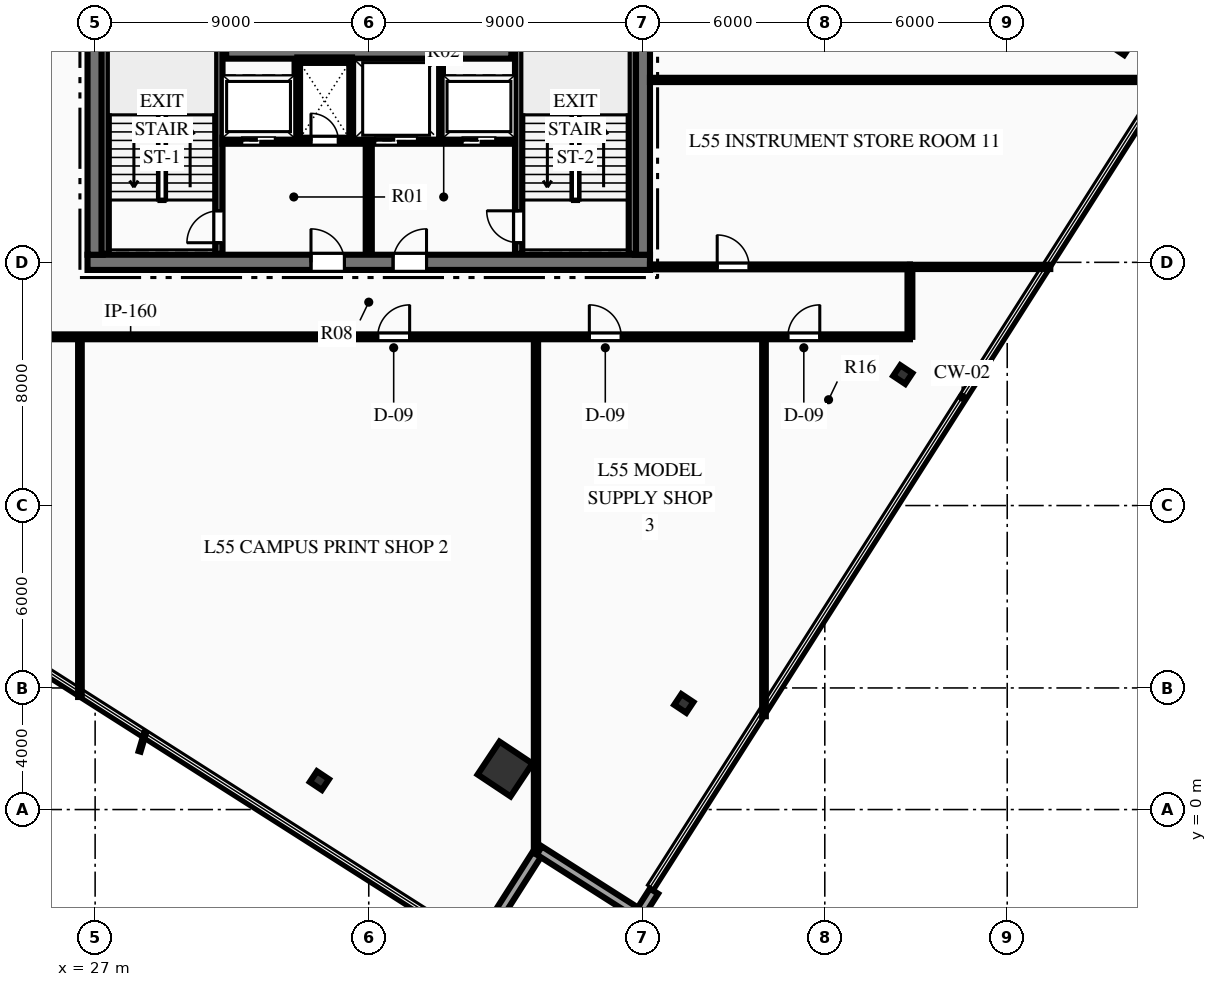
"""IFC4 building model, lengths in metres.
Left out: names, types, materials, properties, quantities, classifications, styles, units other than length and angle.
Written with IfcOpenShell. Run it as: python <this file> out.ifc"""

import sys

from ifc_helpers import new_model, si_unit, direction, frame, frame_2d, origin, origin_2d, place, context, subcontext, project, spatial, rectangle, hollow_rectangle, i_section, extrude, element, fill, save


model = new_model("IFC4")
c1 = context("Model", 3, precision=1e-05, world=origin(), true_north=direction((0.0, 1.0)))
c2 = subcontext(c1, "Body", "Model", "MODEL_VIEW")
j1 = project(units=[si_unit("LENGTHUNIT", "METRE"), si_unit("PLANEANGLEUNIT", "RADIAN")], contexts=[c1])
p1 = place(None, origin())
s1 = spatial("IfcSite", under=j1, at=p1, CompositionType="ELEMENT")
p2 = place(p1, origin())
s2 = spatial("IfcBuilding", under=s1, at=p2, CompositionType="ELEMENT")
p3 = place(p2, frame((0.0, 0.0, 220.95)))
s3 = spatial("IfcBuildingStorey", under=s2, at=p3, CompositionType="ELEMENT", Elevation=220.95)
p4 = place(p3, frame((26.75, 18.0, 0.0), z_axis=(0.0, 0.0, 1.0), x_axis=(1.0, 0.0, 0.0)))
e1 = element("IfcWall", 1, at=p4, inside=s3, PredefinedType="SHEAR", context=c2, shape_type="SweptSolid", body=[
    extrude(rectangle(XDim=18.5, YDim=0.5, at=frame_2d((9.25, 0.0))), origin(), (0.0, 0.0, 1.0), 3.75),
])
p5 = place(p4, frame((7.35, 0.0, 0.0)))
e2 = element("IfcOpeningElement", 2, at=p5, cuts=e1, PredefinedType="OPENING", context=c2, shape_type="SweptSolid", body=[
    extrude(rectangle(XDim=1.1, YDim=2.15, at=frame_2d((0.55, 1.075))), frame((0.0, 0.26, 0.0), z_axis=(0.0, -1.0, 0.0), x_axis=(1.0, 0.0, 0.0)), (0.0, 0.0, 1.0), 0.52),
])
p6 = place(p4, frame((10.05, 0.0, 0.0)))
e3 = element("IfcOpeningElement", 3, at=p6, cuts=e1, PredefinedType="OPENING", context=c2, shape_type="SweptSolid", body=[
    extrude(rectangle(XDim=1.1, YDim=2.15, at=frame_2d((0.55, 1.075))), frame((0.0, 0.26, 0.0), z_axis=(0.0, -1.0, 0.0), x_axis=(1.0, 0.0, 0.0)), (0.0, 0.0, 1.0), 0.52),
])
p7 = place(p3, frame((27.0, 18.25, 0.0), z_axis=(0.0, 0.0, 1.0), x_axis=(0.0, 1.0, 0.0)))
e4 = element("IfcWall", 4, at=p7, inside=s3, PredefinedType="SHEAR", context=c2, shape_type="SweptSolid", body=[
    extrude(rectangle(XDim=15.5, YDim=0.5, at=frame_2d((7.75, 0.0))), origin(), (0.0, 0.0, 1.0), 3.75),
])
p8 = place(p7, frame((9.99, 0.0, 0.0)))
e5 = element("IfcOpeningElement", 5, at=p8, cuts=e4, PredefinedType="OPENING", context=c2, shape_type="SweptSolid", body=[
    extrude(rectangle(XDim=1.4, YDim=2.2, at=frame_2d((0.7, 1.1))), frame((0.0, 0.26, 0.0), z_axis=(0.0, -1.0, 0.0), x_axis=(1.0, 0.0, 0.0)), (0.0, 0.0, 1.0), 0.52),
])
p9 = place(p3, frame((45.0, 18.25, 0.0), z_axis=(0.0, 0.0, 1.0), x_axis=(0.0, 1.0, 0.0)))
e6 = element("IfcWall", 6, at=p9, inside=s3, PredefinedType="SHEAR", context=c2, shape_type="SweptSolid", body=[
    extrude(rectangle(XDim=15.5, YDim=0.5, at=frame_2d((7.75, 0.0))), origin(), (0.0, 0.0, 1.0), 3.75),
])
p10 = place(p9, frame((9.99, 0.0, 0.0)))
e7 = element("IfcOpeningElement", 7, at=p10, cuts=e6, PredefinedType="OPENING", context=c2, shape_type="SweptSolid", body=[
    extrude(rectangle(XDim=1.4, YDim=2.2, at=frame_2d((0.7, 1.1))), frame((0.0, 0.26, 0.0), z_axis=(0.0, -1.0, 0.0), x_axis=(1.0, 0.0, 0.0)), (0.0, 0.0, 1.0), 0.52),
])
p11 = place(p3, frame((31.31, 24.95, 0.0), z_axis=(0.0, 0.0, 1.0), x_axis=(1.0, 0.0, 0.0)))
e8 = element("IfcWall", 8, at=p11, inside=s3, PredefinedType="SHEAR", context=c2, shape_type="SweptSolid", body=[
    extrude(rectangle(XDim=9.38, YDim=0.5, at=frame_2d((4.69, 0.0))), origin(), (0.0, 0.0, 1.0), 3.75),
])
p12 = place(p3, frame((31.07, 18.28, 0.0), z_axis=(0.0, 0.0, 1.0), x_axis=(0.0, 1.0, 0.0)))
e9 = element("IfcWall", 9, at=p12, inside=s3, PredefinedType="SHEAR", context=c2, shape_type="SweptSolid", body=[
    extrude(rectangle(XDim=8.26, YDim=0.24, at=frame_2d((4.13, 0.0))), origin(), (0.0, 0.0, 1.0), 3.75),
])
p13 = place(p12, frame((0.365, 0.0, 0.0)))
e10 = element("IfcOpeningElement", 10, at=p13, cuts=e9, PredefinedType="OPENING", context=c2, shape_type="SweptSolid", body=[
    extrude(rectangle(XDim=1.05, YDim=2.15, at=frame_2d((0.525, 1.075))), frame((0.0, 0.13, 0.0), z_axis=(0.0, -1.0, 0.0), x_axis=(1.0, 0.0, 0.0)), (0.0, 0.0, 1.0), 0.26),
])
p14 = place(p3, frame((27.33, 18.28, 0.0), z_axis=(0.0, 0.0, 1.0), x_axis=(0.0, 1.0, 0.0)))
e11 = element("IfcWall", 11, at=p14, inside=s3, PredefinedType="SHEAR", context=c2, shape_type="SweptSolid", body=[
    extrude(rectangle(XDim=8.26, YDim=0.24, at=frame_2d((4.13, 0.0))), origin(), (0.0, 0.0, 1.0), 3.75),
])
p15 = place(p3, frame((40.93, 18.28, 0.0), z_axis=(0.0, 0.0, 1.0), x_axis=(0.0, 1.0, 0.0)))
e12 = element("IfcWall", 12, at=p15, inside=s3, PredefinedType="SHEAR", context=c2, shape_type="SweptSolid", body=[
    extrude(rectangle(XDim=8.26, YDim=0.24, at=frame_2d((4.13, 0.0))), origin(), (0.0, 0.0, 1.0), 3.75),
])
p16 = place(p15, frame((0.365, 0.0, 0.0)))
e13 = element("IfcOpeningElement", 13, at=p16, cuts=e12, PredefinedType="OPENING", context=c2, shape_type="SweptSolid", body=[
    extrude(rectangle(XDim=1.05, YDim=2.15, at=frame_2d((0.525, 1.075))), frame((0.0, 0.13, 0.0), z_axis=(0.0, -1.0, 0.0), x_axis=(1.0, 0.0, 0.0)), (0.0, 0.0, 1.0), 0.26),
])
p17 = place(p3, frame((44.67, 18.28, 0.0), z_axis=(0.0, 0.0, 1.0), x_axis=(0.0, 1.0, 0.0)))
e14 = element("IfcWall", 14, at=p17, inside=s3, PredefinedType="SHEAR", context=c2, shape_type="SweptSolid", body=[
    extrude(rectangle(XDim=8.26, YDim=0.24, at=frame_2d((4.13, 0.0))), origin(), (0.0, 0.0, 1.0), 3.75),
])
p18 = place(p3, frame((40.483, 1.333, 0.0), z_axis=(0.0, 0.0, 1.0), x_axis=(0.554118199338, 0.832437998389, 0.0)))
e15 = element("IfcColumn", 15, at=p18, inside=s3, PredefinedType="COLUMN", context=c2, shape_type="SweptSolid", body=[
    extrude(hollow_rectangle(XDim=1.3, YDim=1.3, WallThickness=0.06, at=origin_2d()), origin(), (0.0, 0.0, 1.0), 3.75),
])
for number, where, z_axis, x_axis in (
    (16, (46.363, 3.49, 0.0), (0.0, 0.0, 1.0), (0.554, 0.832, 0.0)),
    (17, (53.564, 14.308, 0.0), (0.0, 0.0, 1.0), (0.554, 0.832, 0.0)),
    (18, (60.766, 25.126, 0.0), (0.0, 0.0, 1.0), (0.554, 0.832, 0.0)),
    (19, (34.377, 0.952, 0.0), (0.0, 0.0, 1.0), (0.554, 0.832, 0.0)),
):
    element("IfcColumn", number, at=place(p3, frame(where, z_axis=z_axis, x_axis=x_axis)), inside=s3, PredefinedType="COLUMN", context=c2, shape_type="SweptSolid", body=[
        extrude(i_section(OverallWidth=0.424, OverallDepth=0.474, WebThickness=0.048, FlangeThickness=0.077, at=origin_2d()), origin(), (0.0, 0.0, 1.0), 3.75),
    ])
p19 = place(p3, frame((45.383, -2.683, 0.0), z_axis=(0.0, 0.0, 1.0), x_axis=(-0.537366861127, -0.843348597297, 0.0)))
e20 = element("IfcWall", 20, at=p19, inside=s3, PredefinedType="STANDARD", context=c2, shape_type="SweptSolid", body=[
    extrude(rectangle(XDim=0.9, YDim=0.32, at=frame_2d((0.45, 0.0))), origin(), (0.0, 0.0, 1.0), 3.47),
])
p20 = place(p3, frame((41.61, -1.347, 0.0), z_axis=(0.0, 0.0, 1.0), x_axis=(-0.537288582266, -0.8433984701, 0.0)))
e21 = element("IfcWall", 21, at=p20, inside=s3, PredefinedType="STANDARD", context=c2, shape_type="SweptSolid", body=[
    extrude(rectangle(XDim=3.9, YDim=0.32, at=frame_2d((1.95, 0.0))), origin(), (0.0, 0.0, 1.0), 3.47),
])
p21 = place(p3, frame((44.899, -3.442, 0.0), z_axis=(0.0, 0.0, 1.0), x_axis=(-0.843380397605, 0.537316950166, 0.0)))
e22 = element("IfcWall", 22, at=p21, inside=s3, PredefinedType="STANDARD", context=c2, shape_type="SweptSolid", body=[
    extrude(rectangle(XDim=3.9, YDim=0.32, at=frame_2d((1.95, 0.0))), origin(), (0.0, 0.0, 1.0), 3.47),
])
p22 = place(p3, frame((36.0, 18.28, 0.0), z_axis=(0.0, 0.0, 1.0), x_axis=(0.0, 1.0, 0.0)))
e23 = element("IfcWall", 23, at=p22, inside=s3, PredefinedType="PARTITIONING", context=c2, shape_type="SweptSolid", body=[
    extrude(rectangle(XDim=3.77, YDim=0.2, at=frame_2d((1.885, 0.0))), origin(), (0.0, 0.0, 1.0), 3.47),
])
p23 = place(p3, frame((31.19, 22.0, 0.0), z_axis=(0.0, 0.0, 1.0), x_axis=(1.0, 0.0, 0.0)))
e24 = element("IfcWall", 24, at=p23, inside=s3, PredefinedType="PARTITIONING", context=c2, shape_type="SweptSolid", body=[
    extrude(rectangle(XDim=4.69, YDim=0.2, at=frame_2d((2.345, 0.0))), origin(), (0.0, 0.0, 1.0), 3.47),
])
p24 = place(p23, frame((2.91, 0.0, 0.0)))
e25 = element("IfcOpeningElement", 25, at=p24, cuts=e24, PredefinedType="OPENING", context=c2, shape_type="SweptSolid", body=[
    extrude(rectangle(XDim=0.9, YDim=2.15, at=frame_2d((0.45, 1.075))), frame((0.0, 0.11, 0.0), z_axis=(0.0, -1.0, 0.0), x_axis=(1.0, 0.0, 0.0)), (0.0, 0.0, 1.0), 0.22),
])
p25 = place(p23, frame((0.635, 0.0, 0.0)))
e26 = element("IfcOpeningElement", 26, at=p25, cuts=e24, PredefinedType="OPENING", context=c2, shape_type="SweptSolid", body=[
    extrude(rectangle(XDim=1.1, YDim=2.15, at=frame_2d((0.55, 1.075))), frame((0.0, 0.11, 0.0), z_axis=(0.0, -1.0, 0.0), x_axis=(1.0, 0.0, 0.0)), (0.0, 0.0, 1.0), 0.22),
])
p26 = place(p3, frame((36.12, 22.0, 0.0), z_axis=(0.0, 0.0, 1.0), x_axis=(1.0, 0.0, 0.0)))
e27 = element("IfcWall", 27, at=p26, inside=s3, PredefinedType="PARTITIONING", context=c2, shape_type="SweptSolid", body=[
    extrude(rectangle(XDim=4.69, YDim=0.2, at=frame_2d((2.345, 0.0))), origin(), (0.0, 0.0, 1.0), 3.47),
])
p27 = place(p26, frame((2.955, 0.0, 0.0)))
e28 = element("IfcOpeningElement", 28, at=p27, cuts=e27, PredefinedType="OPENING", context=c2, shape_type="SweptSolid", body=[
    extrude(rectangle(XDim=1.1, YDim=2.15, at=frame_2d((0.55, 1.075))), frame((0.0, 0.11, 0.0), z_axis=(0.0, -1.0, 0.0), x_axis=(1.0, 0.0, 0.0)), (0.0, 0.0, 1.0), 0.22),
])
p28 = place(p26, frame((0.08, 0.0, 0.0)))
e29 = element("IfcOpeningElement", 29, at=p28, cuts=e27, PredefinedType="OPENING", context=c2, shape_type="SweptSolid", body=[
    extrude(rectangle(XDim=1.4, YDim=2.2, at=frame_2d((0.7, 1.1))), frame((0.0, 0.11, 0.0), z_axis=(0.0, -1.0, 0.0), x_axis=(1.0, 0.0, 0.0)), (0.0, 0.0, 1.0), 0.22),
])
for number, where, z_axis, x_axis in (
    (30, (33.65, 22.05, 0.0), (0.0, 0.0, 1.0), (0.0, 1.0, 0.0)),
    (31, (35.45, 22.05, 0.0), (0.0, 0.0, 1.0), (0.0, 1.0, 0.0)),
):
    element("IfcWall", number, at=place(p3, frame(where, z_axis=z_axis, x_axis=x_axis)), inside=s3, PredefinedType="PARTITIONING", context=c2, shape_type="SweptSolid", body=[
        extrude(rectangle(XDim=2.6, YDim=0.18, at=frame_2d((1.3, 0.0))), origin(), (0.0, 0.0, 1.0), 3.47),
    ])
p29 = place(p3, frame((33.65, 24.65, 0.0), z_axis=(0.0, 0.0, 1.0), x_axis=(1.0, 0.0, 0.0)))
e32 = element("IfcWall", 32, at=p29, inside=s3, PredefinedType="PARTITIONING", context=c2, shape_type="SweptSolid", body=[
    extrude(rectangle(XDim=1.8, YDim=0.18, at=frame_2d((0.9, 0.0))), origin(), (0.0, 0.0, 1.0), 3.47),
])
p30 = place(p3, frame((38.35, 22.05, 0.0), z_axis=(0.0, 0.0, 1.0), x_axis=(0.0, 1.0, 0.0)))
e33 = element("IfcWall", 33, at=p30, inside=s3, PredefinedType="PARTITIONING", context=c2, shape_type="SweptSolid", body=[
    extrude(rectangle(XDim=2.6, YDim=0.18, at=frame_2d((1.3, 0.0))), origin(), (0.0, 0.0, 1.0), 3.47),
])
p31 = place(p3, frame((18.2, 15.55, 0.0), z_axis=(0.0, 0.0, 1.0), x_axis=(1.0, 0.0, 0.0)))
e34 = element("IfcWall", 34, at=p31, inside=s3, PredefinedType="PARTITIONING", context=c2, shape_type="SweptSolid", body=[
    extrude(rectangle(XDim=35.6, YDim=0.16, at=frame_2d((17.8, 0.0))), origin(), (0.0, 0.0, 1.0), 2.849),
])
p32 = place(p31, frame((3.791, 0.0, 0.0)))
e35 = element("IfcOpeningElement", 35, at=p32, cuts=e34, PredefinedType="OPENING", context=c2, shape_type="SweptSolid", body=[
    extrude(rectangle(XDim=1.05, YDim=2.15, at=frame_2d((0.525, 1.075))), frame((0.0, 0.09, 0.0), z_axis=(0.0, -1.0, 0.0), x_axis=(1.0, 0.0, 0.0)), (0.0, 0.0, 1.0), 0.18),
])
p33 = place(p31, frame((18.095, 0.0, 0.0)))
e36 = element("IfcOpeningElement", 36, at=p33, cuts=e34, PredefinedType="OPENING", context=c2, shape_type="SweptSolid", body=[
    extrude(rectangle(XDim=1.05, YDim=2.15, at=frame_2d((0.525, 1.075))), frame((0.0, 0.09, 0.0), z_axis=(0.0, -1.0, 0.0), x_axis=(1.0, 0.0, 0.0)), (0.0, 0.0, 1.0), 0.18),
])
p34 = place(p31, frame((25.055, 0.0, 0.0)))
e37 = element("IfcOpeningElement", 37, at=p34, cuts=e34, PredefinedType="OPENING", context=c2, shape_type="SweptSolid", body=[
    extrude(rectangle(XDim=1.05, YDim=2.15, at=frame_2d((0.525, 1.075))), frame((0.0, 0.09, 0.0), z_axis=(0.0, -1.0, 0.0), x_axis=(1.0, 0.0, 0.0)), (0.0, 0.0, 1.0), 0.18),
])
p35 = place(p31, frame((31.585, 0.0, 0.0)))
e38 = element("IfcOpeningElement", 38, at=p35, cuts=e34, PredefinedType="OPENING", context=c2, shape_type="SweptSolid", body=[
    extrude(rectangle(XDim=1.05, YDim=2.15, at=frame_2d((0.525, 1.075))), frame((0.0, 0.09, 0.0), z_axis=(0.0, -1.0, 0.0), x_axis=(1.0, 0.0, 0.0)), (0.0, 0.0, 1.0), 0.18),
])
p36 = place(p3, frame((45.25, 17.85, 0.0), z_axis=(0.0, 0.0, 1.0), x_axis=(1.0, 0.0, 0.0)))
e39 = element("IfcWall", 39, at=p36, inside=s3, PredefinedType="PARTITIONING", context=c2, shape_type="SweptSolid", body=[
    extrude(rectangle(XDim=8.55, YDim=0.16, at=frame_2d((4.275, 0.0))), origin(), (0.0, 0.0, 1.0), 3.47),
])
p37 = place(p36, frame((2.211, 0.0, 0.0)))
e40 = element("IfcOpeningElement", 40, at=p37, cuts=e39, PredefinedType="OPENING", context=c2, shape_type="SweptSolid", body=[
    extrude(rectangle(XDim=1.05, YDim=2.15, at=frame_2d((0.525, 1.075))), frame((0.0, 0.09, 0.0), z_axis=(0.0, -1.0, 0.0), x_axis=(1.0, 0.0, 0.0)), (0.0, 0.0, 1.0), 0.18),
])
p38 = place(p3, frame((53.8, 15.55, 0.0), z_axis=(0.0, 0.0, 1.0), x_axis=(0.0, 1.0, 0.0)))
e41 = element("IfcWall", 41, at=p38, inside=s3, PredefinedType="PARTITIONING", context=c2, shape_type="SweptSolid", body=[
    extrude(rectangle(XDim=2.3, YDim=0.16, at=frame_2d((1.15, 0.0))), origin(), (0.0, 0.0, 1.0), 3.47),
])
p39 = place(p3, frame((53.8, 17.85, 0.0), z_axis=(0.0, 0.0, 1.0), x_axis=(1.0, 0.0, 0.0)))
e42 = element("IfcWall", 42, at=p39, inside=s3, PredefinedType="PARTITIONING", context=c2, shape_type="SweptSolid", body=[
    extrude(rectangle(XDim=4.616, YDim=0.14, at=frame_2d((2.308, 0.0))), origin(), (0.0, 0.0, 1.0), 3.47),
])
p40 = place(p3, frame((26.5, 3.702, 0.0), z_axis=(0.0, 0.0, 1.0), x_axis=(0.0, 1.0, 0.0)))
e43 = element("IfcWall", 43, at=p40, inside=s3, PredefinedType="PARTITIONING", context=c2, shape_type="SweptSolid", body=[
    extrude(rectangle(XDim=11.848, YDim=0.12, at=frame_2d((5.924, 0.0))), origin(), (0.0, 0.0, 1.0), 2.849),
])
p41 = place(p3, frame((41.5, -1.445, 0.0), z_axis=(0.0, 0.0, 1.0), x_axis=(0.0, 1.0, 0.0)))
e44 = element("IfcWall", 44, at=p41, inside=s3, PredefinedType="PARTITIONING", context=c2, shape_type="SweptSolid", body=[
    extrude(rectangle(XDim=16.995, YDim=0.14, at=frame_2d((8.498, 0.0))), origin(), (0.0, 0.0, 1.0), 3.47),
])
p42 = place(p3, frame((49.0, 3.069, 0.0), z_axis=(0.0, 0.0, 1.0), x_axis=(0.0, 1.0, 0.0)))
e45 = element("IfcWall", 45, at=p42, inside=s3, PredefinedType="PARTITIONING", context=c2, shape_type="SweptSolid", body=[
    extrude(rectangle(XDim=12.481, YDim=0.12, at=frame_2d((6.241, 0.0))), origin(), (0.0, 0.0, 1.0), 3.47),
])
p43 = place(p3, frame((45.25, 24.0, 0.0), z_axis=(0.0, 0.0, 1.0), x_axis=(1.0, 0.0, 0.0)))
e46 = element("IfcWall", 46, at=p43, inside=s3, PredefinedType="PARTITIONING", context=c2, shape_type="SweptSolid", body=[
    extrude(rectangle(XDim=17.085, YDim=0.14, at=frame_2d((8.542, 0.0))), origin(), (0.0, 0.0, 1.0), 3.47),
])
p44 = place(p13, origin())
e47 = element("IfcDoor", 47, at=p44, inside=s3, OperationType="SINGLE_SWING_LEFT", PredefinedType="DOOR", context=c2, shape_type="SweptSolid", body=[
    extrude(rectangle(XDim=1.05, YDim=2.15, at=frame_2d((0.525, 1.075))), frame((0.0, 0.025, 0.0), z_axis=(0.0, -1.0, 0.0), x_axis=(1.0, 0.0, 0.0)), (0.0, 0.0, 1.0), 0.05),
])
fill(e10, e47)
p45 = place(p16, origin())
e48 = element("IfcDoor", 48, at=p45, inside=s3, OperationType="SINGLE_SWING_RIGHT", PredefinedType="DOOR", context=c2, shape_type="SweptSolid", body=[
    extrude(rectangle(XDim=1.05, YDim=2.15, at=frame_2d((0.525, 1.075))), frame((0.0, 0.025, 0.0), z_axis=(0.0, -1.0, 0.0), x_axis=(1.0, 0.0, 0.0)), (0.0, 0.0, 1.0), 0.05),
])
fill(e13, e48)
p46 = place(p5, origin())
e49 = element("IfcDoor", 49, at=p46, inside=s3, OperationType="SINGLE_SWING_LEFT", PredefinedType="DOOR", context=c2, shape_type="SweptSolid", body=[
    extrude(rectangle(XDim=1.1, YDim=2.15, at=frame_2d((0.55, 1.075))), frame((0.0, 0.025, 0.0), z_axis=(0.0, -1.0, 0.0), x_axis=(1.0, 0.0, 0.0)), (0.0, 0.0, 1.0), 0.05),
])
fill(e2, e49)
p47 = place(p6, origin())
e50 = element("IfcDoor", 50, at=p47, inside=s3, OperationType="SINGLE_SWING_RIGHT", PredefinedType="DOOR", context=c2, shape_type="SweptSolid", body=[
    extrude(rectangle(XDim=1.1, YDim=2.15, at=frame_2d((0.55, 1.075))), frame((0.0, 0.025, 0.0), z_axis=(0.0, -1.0, 0.0), x_axis=(1.0, 0.0, 0.0)), (0.0, 0.0, 1.0), 0.05),
])
fill(e3, e50)
p48 = place(p24, origin())
e51 = element("IfcDoor", 51, at=p48, inside=s3, OperationType="SINGLE_SWING_LEFT", PredefinedType="DOOR", context=c2, shape_type="SweptSolid", body=[
    extrude(rectangle(XDim=0.9, YDim=2.15, at=frame_2d((0.45, 1.075))), frame((0.0, 0.025, 0.0), z_axis=(0.0, -1.0, 0.0), x_axis=(1.0, 0.0, 0.0)), (0.0, 0.0, 1.0), 0.05),
])
fill(e25, e51)
p49 = place(p33, origin())
e52 = element("IfcDoor", 52, at=p49, inside=s3, OperationType="SINGLE_SWING_RIGHT", PredefinedType="DOOR", context=c2, shape_type="SweptSolid", body=[
    extrude(rectangle(XDim=1.05, YDim=2.15, at=frame_2d((0.525, 1.075))), frame((0.0, 0.025, 0.0), z_axis=(0.0, -1.0, 0.0), x_axis=(1.0, 0.0, 0.0)), (0.0, 0.0, 1.0), 0.05),
])
fill(e36, e52)
p50 = place(p34, origin())
e53 = element("IfcDoor", 53, at=p50, inside=s3, OperationType="SINGLE_SWING_LEFT", PredefinedType="DOOR", context=c2, shape_type="SweptSolid", body=[
    extrude(rectangle(XDim=1.05, YDim=2.15, at=frame_2d((0.525, 1.075))), frame((0.0, 0.025, 0.0), z_axis=(0.0, -1.0, 0.0), x_axis=(1.0, 0.0, 0.0)), (0.0, 0.0, 1.0), 0.05),
])
fill(e37, e53)
p51 = place(p35, origin())
e54 = element("IfcDoor", 54, at=p51, inside=s3, OperationType="SINGLE_SWING_RIGHT", PredefinedType="DOOR", context=c2, shape_type="SweptSolid", body=[
    extrude(rectangle(XDim=1.05, YDim=2.15, at=frame_2d((0.525, 1.075))), frame((0.0, 0.025, 0.0), z_axis=(0.0, -1.0, 0.0), x_axis=(1.0, 0.0, 0.0)), (0.0, 0.0, 1.0), 0.05),
])
fill(e38, e54)
p52 = place(p37, origin())
e55 = element("IfcDoor", 55, at=p52, inside=s3, OperationType="SINGLE_SWING_LEFT", PredefinedType="DOOR", context=c2, shape_type="SweptSolid", body=[
    extrude(rectangle(XDim=1.05, YDim=2.15, at=frame_2d((0.525, 1.075))), frame((0.0, 0.025, 0.0), z_axis=(0.0, -1.0, 0.0), x_axis=(1.0, 0.0, 0.0)), (0.0, 0.0, 1.0), 0.05),
])
fill(e40, e55)
p53 = place(p25, origin())
e56 = element("IfcDoor", 56, at=p53, inside=s3, OperationType="SLIDING_TO_LEFT", PredefinedType="DOOR", context=c2, shape_type="SweptSolid", body=[
    extrude(rectangle(XDim=1.1, YDim=2.15, at=frame_2d((0.55, 1.075))), frame((0.0, 0.025, 0.0), z_axis=(0.0, -1.0, 0.0), x_axis=(1.0, 0.0, 0.0)), (0.0, 0.0, 1.0), 0.05),
])
fill(e26, e56)
p54 = place(p27, origin())
e57 = element("IfcDoor", 57, at=p54, inside=s3, OperationType="SLIDING_TO_LEFT", PredefinedType="DOOR", context=c2, shape_type="SweptSolid", body=[
    extrude(rectangle(XDim=1.1, YDim=2.15, at=frame_2d((0.55, 1.075))), frame((0.0, 0.025, 0.0), z_axis=(0.0, -1.0, 0.0), x_axis=(1.0, 0.0, 0.0)), (0.0, 0.0, 1.0), 0.05),
])
fill(e28, e57)
p55 = place(p28, origin())
e58 = element("IfcDoor", 58, at=p55, inside=s3, OperationType="SLIDING_TO_LEFT", PredefinedType="DOOR", context=c2, shape_type="SweptSolid", body=[
    extrude(rectangle(XDim=1.4, YDim=2.2, at=frame_2d((0.7, 1.1))), frame((0.0, 0.025, 0.0), z_axis=(0.0, -1.0, 0.0), x_axis=(1.0, 0.0, 0.0)), (0.0, 0.0, 1.0), 0.05),
])
fill(e29, e58)
save(model, sys.argv[1])
